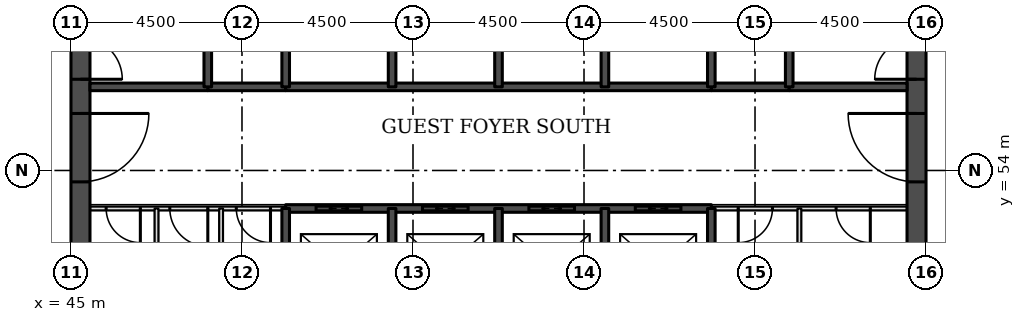
"""IFC4 building model, lengths in metres.
Left out: names, types, materials, properties, quantities, classifications, styles, units other than length and angle.
Written with IfcOpenShell. Run it as: python <this file> out.ifc"""

import sys

from ifc_helpers import new_model, si_unit, direction, frame, frame_2d, origin, place, context, subcontext, project, spatial, rectangle, extrude, element, fill, save


model = new_model("IFC4")
c1 = context("Model", 3, precision=1e-05, world=origin(), true_north=direction((0.0, 1.0)))
c2 = subcontext(c1, "Body", "Model", "MODEL_VIEW")
j1 = project(units=[si_unit("LENGTHUNIT", "METRE"), si_unit("PLANEANGLEUNIT", "RADIAN")], contexts=[c1])
p1 = place(None, origin())
s1 = spatial("IfcSite", under=j1, at=p1, CompositionType="ELEMENT")
p2 = place(p1, origin())
s2 = spatial("IfcBuilding", under=s1, at=p2, CompositionType="ELEMENT")
p3 = place(p2, frame((0.0, 0.0, 56.1)))
s3 = spatial("IfcBuildingStorey", under=s2, at=p3, CompositionType="ELEMENT", Elevation=56.1)
p4 = place(p3, frame((45.25, 49.5, 0.0), z_axis=(0.0, 0.0, 1.0), x_axis=(0.0, 1.0, 0.0)))
e1 = element("IfcWall", 1, at=p4, inside=s3, PredefinedType="SHEAR", context=c2, shape_type="SweptSolid", body=[
    extrude(rectangle(XDim=22.5, YDim=0.5, at=frame_2d((11.25, 0.0))), origin(), (0.0, 0.0, 1.0), 3.3),
])
p5 = place(p4, frame((4.2, 0.0, 0.0)))
e2 = element("IfcOpeningElement", 2, at=p5, cuts=e1, PredefinedType="OPENING", context=c2, shape_type="SweptSolid", body=[
    extrude(rectangle(XDim=1.8, YDim=2.1, at=frame_2d((0.9, 1.05))), frame((0.0, 0.26, 0.0), z_axis=(0.0, -1.0, 0.0), x_axis=(1.0, 0.0, 0.0)), (0.0, 0.0, 1.0), 0.52),
])
p6 = place(p4, frame((6.9, 0.0, 0.0)))
e3 = element("IfcOpeningElement", 3, at=p6, cuts=e1, PredefinedType="OPENING", context=c2, shape_type="SweptSolid", body=[
    extrude(rectangle(XDim=1.1, YDim=2.1, at=frame_2d((0.55, 1.05))), frame((0.0, 0.26, 0.0), z_axis=(0.0, -1.0, 0.0), x_axis=(1.0, 0.0, 0.0)), (0.0, 0.0, 1.0), 0.52),
])
p7 = place(p4, frame((13.6, 0.0, 0.0)))
e4 = element("IfcOpeningElement", 4, at=p7, cuts=e1, PredefinedType="OPENING", context=c2, shape_type="SweptSolid", body=[
    extrude(rectangle(XDim=1.1, YDim=2.1, at=frame_2d((0.55, 1.05))), frame((0.0, 0.26, 0.0), z_axis=(0.0, -1.0, 0.0), x_axis=(1.0, 0.0, 0.0)), (0.0, 0.0, 1.0), 0.52),
])
p8 = place(p4, frame((16.5, 0.0, 0.0)))
e5 = element("IfcOpeningElement", 5, at=p8, cuts=e1, PredefinedType="OPENING", context=c2, shape_type="SweptSolid", body=[
    extrude(rectangle(XDim=1.8, YDim=2.1, at=frame_2d((0.9, 1.05))), frame((0.0, 0.26, 0.0), z_axis=(0.0, -1.0, 0.0), x_axis=(1.0, 0.0, 0.0)), (0.0, 0.0, 1.0), 0.52),
])
p9 = place(p3, frame((67.25, 49.5, 0.0), z_axis=(0.0, 0.0, 1.0), x_axis=(0.0, 1.0, 0.0)))
e6 = element("IfcWall", 6, at=p9, inside=s3, PredefinedType="SHEAR", context=c2, shape_type="SweptSolid", body=[
    extrude(rectangle(XDim=22.5, YDim=0.5, at=frame_2d((11.25, 0.0))), origin(), (0.0, 0.0, 1.0), 3.3),
])
p10 = place(p9, frame((4.2, 0.0, 0.0)))
e7 = element("IfcOpeningElement", 7, at=p10, cuts=e6, PredefinedType="OPENING", context=c2, shape_type="SweptSolid", body=[
    extrude(rectangle(XDim=1.8, YDim=2.1, at=frame_2d((0.9, 1.05))), frame((0.0, 0.26, 0.0), z_axis=(0.0, -1.0, 0.0), x_axis=(1.0, 0.0, 0.0)), (0.0, 0.0, 1.0), 0.52),
])
p11 = place(p9, frame((6.9, 0.0, 0.0)))
e8 = element("IfcOpeningElement", 8, at=p11, cuts=e6, PredefinedType="OPENING", context=c2, shape_type="SweptSolid", body=[
    extrude(rectangle(XDim=1.1, YDim=2.1, at=frame_2d((0.55, 1.05))), frame((0.0, 0.26, 0.0), z_axis=(0.0, -1.0, 0.0), x_axis=(1.0, 0.0, 0.0)), (0.0, 0.0, 1.0), 0.52),
])
p12 = place(p9, frame((13.6, 0.0, 0.0)))
e9 = element("IfcOpeningElement", 9, at=p12, cuts=e6, PredefinedType="OPENING", context=c2, shape_type="SweptSolid", body=[
    extrude(rectangle(XDim=1.1, YDim=2.1, at=frame_2d((0.55, 1.05))), frame((0.0, 0.26, 0.0), z_axis=(0.0, -1.0, 0.0), x_axis=(1.0, 0.0, 0.0)), (0.0, 0.0, 1.0), 0.52),
])
p13 = place(p9, frame((16.5, 0.0, 0.0)))
e10 = element("IfcOpeningElement", 10, at=p13, cuts=e6, PredefinedType="OPENING", context=c2, shape_type="SweptSolid", body=[
    extrude(rectangle(XDim=1.8, YDim=2.1, at=frame_2d((0.9, 1.05))), frame((0.0, 0.26, 0.0), z_axis=(0.0, -1.0, 0.0), x_axis=(1.0, 0.0, 0.0)), (0.0, 0.0, 1.0), 0.52),
])
p14 = place(p3, frame((45.5, 53.0, 0.0), z_axis=(0.0, 0.0, 1.0), x_axis=(1.0, 0.0, 0.0)))
e11 = element("IfcWall", 11, at=p14, inside=s3, PredefinedType="PARTITIONING", context=c2, shape_type="SweptSolid", body=[
    extrude(rectangle(XDim=5.15, YDim=0.1, at=frame_2d((2.575, 0.0))), origin(), (0.0, 0.0, 1.0), 3.08),
])
p15 = place(p14, frame((0.426, 0.0, 0.0)))
e12 = element("IfcOpeningElement", 12, at=p15, cuts=e11, PredefinedType="OPENING", context=c2, shape_type="SweptSolid", body=[
    extrude(rectangle(XDim=0.9, YDim=2.1, at=frame_2d((0.45, 1.05))), frame((0.0, 0.06, 0.0), z_axis=(0.0, -1.0, 0.0), x_axis=(1.0, 0.0, 0.0)), (0.0, 0.0, 1.0), 0.12),
])
p16 = place(p14, frame((2.101, 0.0, 0.0)))
e13 = element("IfcOpeningElement", 13, at=p16, cuts=e11, PredefinedType="OPENING", context=c2, shape_type="SweptSolid", body=[
    extrude(rectangle(XDim=1.0, YDim=2.1, at=frame_2d((0.5, 1.05))), frame((0.0, 0.06, 0.0), z_axis=(0.0, -1.0, 0.0), x_axis=(1.0, 0.0, 0.0)), (0.0, 0.0, 1.0), 0.12),
])
p17 = place(p14, frame((3.85, 0.0, 0.0)))
e14 = element("IfcOpeningElement", 14, at=p17, cuts=e11, PredefinedType="OPENING", context=c2, shape_type="SweptSolid", body=[
    extrude(rectangle(XDim=0.9, YDim=2.1, at=frame_2d((0.45, 1.05))), frame((0.0, 0.06, 0.0), z_axis=(0.0, -1.0, 0.0), x_axis=(1.0, 0.0, 0.0)), (0.0, 0.0, 1.0), 0.12),
])
p18 = place(p3, frame((61.85, 53.0, 0.0), z_axis=(0.0, 0.0, 1.0), x_axis=(1.0, 0.0, 0.0)))
e15 = element("IfcWall", 15, at=p18, inside=s3, PredefinedType="PARTITIONING", context=c2, shape_type="SweptSolid", body=[
    extrude(rectangle(XDim=5.15, YDim=0.1, at=frame_2d((2.575, 0.0))), origin(), (0.0, 0.0, 1.0), 3.08),
])
p19 = place(p18, frame((3.284, 0.0, 0.0)))
e16 = element("IfcOpeningElement", 16, at=p19, cuts=e15, PredefinedType="OPENING", context=c2, shape_type="SweptSolid", body=[
    extrude(rectangle(XDim=0.9, YDim=2.1, at=frame_2d((0.45, 1.05))), frame((0.0, 0.06, 0.0), z_axis=(0.0, -1.0, 0.0), x_axis=(1.0, 0.0, 0.0)), (0.0, 0.0, 1.0), 0.12),
])
p20 = place(p18, frame((0.709, 0.0, 0.0)))
e17 = element("IfcOpeningElement", 17, at=p20, cuts=e15, PredefinedType="OPENING", context=c2, shape_type="SweptSolid", body=[
    extrude(rectangle(XDim=0.9, YDim=2.1, at=frame_2d((0.45, 1.05))), frame((0.0, 0.06, 0.0), z_axis=(0.0, -1.0, 0.0), x_axis=(1.0, 0.0, 0.0)), (0.0, 0.0, 1.0), 0.12),
])
p21 = place(p3, frame((50.65, 53.0, 0.0), z_axis=(0.0, 0.0, 1.0), x_axis=(1.0, 0.0, 0.0)))
e18 = element("IfcWall", 18, at=p21, inside=s3, PredefinedType="SOLIDWALL", context=c2, shape_type="SweptSolid", body=[
    extrude(rectangle(XDim=11.2, YDim=0.2, at=frame_2d((5.6, 0.0))), origin(), (0.0, 0.0, 1.0), 3.08),
])
p22 = place(p21, frame((0.8, 0.0, 0.0)))
e19 = element("IfcOpeningElement", 19, at=p22, cuts=e18, PredefinedType="OPENING", context=c2, shape_type="SweptSolid", body=[
    extrude(rectangle(XDim=1.2, YDim=2.1, at=frame_2d((0.6, 1.05))), frame((0.0, 0.11, 0.0), z_axis=(0.0, -1.0, 0.0), x_axis=(1.0, 0.0, 0.0)), (0.0, 0.0, 1.0), 0.22),
])
p23 = place(p21, frame((3.6, 0.0, 0.0)))
e20 = element("IfcOpeningElement", 20, at=p23, cuts=e18, PredefinedType="OPENING", context=c2, shape_type="SweptSolid", body=[
    extrude(rectangle(XDim=1.2, YDim=2.1, at=frame_2d((0.6, 1.05))), frame((0.0, 0.11, 0.0), z_axis=(0.0, -1.0, 0.0), x_axis=(1.0, 0.0, 0.0)), (0.0, 0.0, 1.0), 0.22),
])
p24 = place(p21, frame((6.4, 0.0, 0.0)))
e21 = element("IfcOpeningElement", 21, at=p24, cuts=e18, PredefinedType="OPENING", context=c2, shape_type="SweptSolid", body=[
    extrude(rectangle(XDim=1.2, YDim=2.1, at=frame_2d((0.6, 1.05))), frame((0.0, 0.11, 0.0), z_axis=(0.0, -1.0, 0.0), x_axis=(1.0, 0.0, 0.0)), (0.0, 0.0, 1.0), 0.22),
])
p25 = place(p21, frame((9.2, 0.0, 0.0)))
e22 = element("IfcOpeningElement", 22, at=p25, cuts=e18, PredefinedType="OPENING", context=c2, shape_type="SweptSolid", body=[
    extrude(rectangle(XDim=1.2, YDim=2.1, at=frame_2d((0.6, 1.05))), frame((0.0, 0.11, 0.0), z_axis=(0.0, -1.0, 0.0), x_axis=(1.0, 0.0, 0.0)), (0.0, 0.0, 1.0), 0.22),
])
for number, where, z_axis, x_axis in (
    (23, (48.6, 56.2, 0.0), (0.0, 0.0, 1.0), (1.0, 0.0, 0.0)),
    (24, (61.85, 56.2, 0.0), (0.0, 0.0, 1.0), (1.0, 0.0, 0.0)),
):
    element("IfcWall", number, at=place(p3, frame(where, z_axis=z_axis, x_axis=x_axis)), inside=s3, PredefinedType="SOLIDWALL", context=c2, shape_type="SweptSolid", body=[
        extrude(rectangle(XDim=2.05, YDim=0.2, at=frame_2d((1.025, 0.0))), origin(), (0.0, 0.0, 1.0), 3.08),
    ])
p26 = place(p3, frame((45.5, 56.2, 0.0), z_axis=(0.0, 0.0, 1.0), x_axis=(1.0, 0.0, 0.0)))
e25 = element("IfcWall", 25, at=p26, inside=s3, PredefinedType="SOLIDWALL", context=c2, shape_type="SweptSolid", body=[
    extrude(rectangle(XDim=3.1, YDim=0.2, at=frame_2d((1.55, 0.0))), origin(), (0.0, 0.0, 1.0), 3.08),
])
p27 = place(p3, frame((50.65, 56.2, 0.0), z_axis=(0.0, 0.0, 1.0), x_axis=(1.0, 0.0, 0.0)))
e26 = element("IfcWall", 26, at=p27, inside=s3, PredefinedType="SOLIDWALL", context=c2, shape_type="SweptSolid", body=[
    extrude(rectangle(XDim=11.2, YDim=0.2, at=frame_2d((5.6, 0.0))), origin(), (0.0, 0.0, 1.0), 3.08),
])
p28 = place(p3, frame((63.9, 56.2, 0.0), z_axis=(0.0, 0.0, 1.0), x_axis=(1.0, 0.0, 0.0)))
e27 = element("IfcWall", 27, at=p28, inside=s3, PredefinedType="SOLIDWALL", context=c2, shape_type="SweptSolid", body=[
    extrude(rectangle(XDim=3.1, YDim=0.2, at=frame_2d((1.55, 0.0))), origin(), (0.0, 0.0, 1.0), 3.08),
])
p29 = place(p3, frame((47.251, 50.0, 0.0), z_axis=(0.0, 0.0, 1.0), x_axis=(0.0, 1.0, 0.0)))
e28 = element("IfcWall", 28, at=p29, inside=s3, PredefinedType="PARTITIONING", context=c2, shape_type="SweptSolid", body=[
    extrude(rectangle(XDim=3.0, YDim=0.1, at=frame_2d((1.5, 0.0))), origin(), (0.0, 0.0, 1.0), 3.08),
])
p30 = place(p3, frame((48.6, 56.2, 0.0), z_axis=(0.0, 0.0, 1.0), x_axis=(0.0, 1.0, 0.0)))
e29 = element("IfcWall", 29, at=p30, inside=s3, PredefinedType="SOLIDWALL", context=c2, shape_type="SweptSolid", body=[
    extrude(rectangle(XDim=5.8, YDim=0.2, at=frame_2d((2.9, 0.0))), origin(), (0.0, 0.0, 1.0), 3.08),
])
p31 = place(p3, frame((48.95, 50.0, 0.0), z_axis=(0.0, 0.0, 1.0), x_axis=(0.0, 1.0, 0.0)))
e30 = element("IfcWall", 30, at=p31, inside=s3, PredefinedType="PARTITIONING", context=c2, shape_type="SweptSolid", body=[
    extrude(rectangle(XDim=3.0, YDim=0.1, at=frame_2d((1.5, 0.0))), origin(), (0.0, 0.0, 1.0), 3.08),
])
p32 = place(p3, frame((50.65, 50.0, 0.0), z_axis=(0.0, 0.0, 1.0), x_axis=(0.0, 1.0, 0.0)))
e31 = element("IfcWall", 31, at=p32, inside=s3, PredefinedType="SOLIDWALL", context=c2, shape_type="SweptSolid", body=[
    extrude(rectangle(XDim=3.0, YDim=0.2, at=frame_2d((1.5, 0.0))), origin(), (0.0, 0.0, 1.0), 3.08),
])
p33 = place(p3, frame((50.65, 56.2, 0.0), z_axis=(0.0, 0.0, 1.0), x_axis=(0.0, 1.0, 0.0)))
e32 = element("IfcWall", 32, at=p33, inside=s3, PredefinedType="SOLIDWALL", context=c2, shape_type="SweptSolid", body=[
    extrude(rectangle(XDim=2.8, YDim=0.2, at=frame_2d((1.4, 0.0))), origin(), (0.0, 0.0, 1.0), 3.08),
])
p34 = place(p3, frame((53.45, 50.0, 0.0), z_axis=(0.0, 0.0, 1.0), x_axis=(0.0, 1.0, 0.0)))
e33 = element("IfcWall", 33, at=p34, inside=s3, PredefinedType="SOLIDWALL", context=c2, shape_type="SweptSolid", body=[
    extrude(rectangle(XDim=3.0, YDim=0.2, at=frame_2d((1.5, 0.0))), origin(), (0.0, 0.0, 1.0), 3.08),
])
p35 = place(p3, frame((53.45, 56.2, 0.0), z_axis=(0.0, 0.0, 1.0), x_axis=(0.0, 1.0, 0.0)))
e34 = element("IfcWall", 34, at=p35, inside=s3, PredefinedType="SOLIDWALL", context=c2, shape_type="SweptSolid", body=[
    extrude(rectangle(XDim=2.8, YDim=0.2, at=frame_2d((1.4, 0.0))), origin(), (0.0, 0.0, 1.0), 3.08),
])
p36 = place(p3, frame((56.25, 50.0, 0.0), z_axis=(0.0, 0.0, 1.0), x_axis=(0.0, 1.0, 0.0)))
e35 = element("IfcWall", 35, at=p36, inside=s3, PredefinedType="SOLIDWALL", context=c2, shape_type="SweptSolid", body=[
    extrude(rectangle(XDim=3.0, YDim=0.2, at=frame_2d((1.5, 0.0))), origin(), (0.0, 0.0, 1.0), 3.08),
])
p37 = place(p3, frame((56.25, 56.2, 0.0), z_axis=(0.0, 0.0, 1.0), x_axis=(0.0, 1.0, 0.0)))
e36 = element("IfcWall", 36, at=p37, inside=s3, PredefinedType="SOLIDWALL", context=c2, shape_type="SweptSolid", body=[
    extrude(rectangle(XDim=2.8, YDim=0.2, at=frame_2d((1.4, 0.0))), origin(), (0.0, 0.0, 1.0), 3.08),
])
p38 = place(p3, frame((59.05, 50.0, 0.0), z_axis=(0.0, 0.0, 1.0), x_axis=(0.0, 1.0, 0.0)))
e37 = element("IfcWall", 37, at=p38, inside=s3, PredefinedType="SOLIDWALL", context=c2, shape_type="SweptSolid", body=[
    extrude(rectangle(XDim=3.0, YDim=0.2, at=frame_2d((1.5, 0.0))), origin(), (0.0, 0.0, 1.0), 3.08),
])
p39 = place(p3, frame((59.05, 56.2, 0.0), z_axis=(0.0, 0.0, 1.0), x_axis=(0.0, 1.0, 0.0)))
e38 = element("IfcWall", 38, at=p39, inside=s3, PredefinedType="SOLIDWALL", context=c2, shape_type="SweptSolid", body=[
    extrude(rectangle(XDim=2.8, YDim=0.2, at=frame_2d((1.4, 0.0))), origin(), (0.0, 0.0, 1.0), 3.08),
])
p40 = place(p3, frame((61.85, 50.0, 0.0), z_axis=(0.0, 0.0, 1.0), x_axis=(0.0, 1.0, 0.0)))
e39 = element("IfcWall", 39, at=p40, inside=s3, PredefinedType="SOLIDWALL", context=c2, shape_type="SweptSolid", body=[
    extrude(rectangle(XDim=3.0, YDim=0.2, at=frame_2d((1.5, 0.0))), origin(), (0.0, 0.0, 1.0), 3.08),
])
p41 = place(p3, frame((61.85, 56.2, 0.0), z_axis=(0.0, 0.0, 1.0), x_axis=(0.0, 1.0, 0.0)))
e40 = element("IfcWall", 40, at=p41, inside=s3, PredefinedType="SOLIDWALL", context=c2, shape_type="SweptSolid", body=[
    extrude(rectangle(XDim=2.8, YDim=0.2, at=frame_2d((1.4, 0.0))), origin(), (0.0, 0.0, 1.0), 3.08),
])
p42 = place(p3, frame((63.9, 56.2, 0.0), z_axis=(0.0, 0.0, 1.0), x_axis=(0.0, 1.0, 0.0)))
e41 = element("IfcWall", 41, at=p42, inside=s3, PredefinedType="SOLIDWALL", context=c2, shape_type="SweptSolid", body=[
    extrude(rectangle(XDim=5.8, YDim=0.2, at=frame_2d((2.9, 0.0))), origin(), (0.0, 0.0, 1.0), 3.08),
])
p43 = place(p3, frame((64.167, 50.0, 0.0), z_axis=(0.0, 0.0, 1.0), x_axis=(0.0, 1.0, 0.0)))
e42 = element("IfcWall", 42, at=p43, inside=s3, PredefinedType="PARTITIONING", context=c2, shape_type="SweptSolid", body=[
    extrude(rectangle(XDim=3.0, YDim=0.1, at=frame_2d((1.5, 0.0))), origin(), (0.0, 0.0, 1.0), 3.08),
])
p44 = place(p22, origin())
e43 = element("IfcDoor", 43, at=p44, inside=s3, OperationType="DOUBLE_DOOR_SLIDING", PredefinedType="DOOR", context=c2, shape_type="SweptSolid", body=[
    extrude(rectangle(XDim=1.2, YDim=2.1, at=frame_2d((0.6, 1.05))), frame((0.0, 0.025, 0.0), z_axis=(0.0, -1.0, 0.0), x_axis=(1.0, 0.0, 0.0)), (0.0, 0.0, 1.0), 0.05),
])
fill(e19, e43)
p45 = place(p23, origin())
e44 = element("IfcDoor", 44, at=p45, inside=s3, OperationType="DOUBLE_DOOR_SLIDING", PredefinedType="DOOR", context=c2, shape_type="SweptSolid", body=[
    extrude(rectangle(XDim=1.2, YDim=2.1, at=frame_2d((0.6, 1.05))), frame((0.0, 0.025, 0.0), z_axis=(0.0, -1.0, 0.0), x_axis=(1.0, 0.0, 0.0)), (0.0, 0.0, 1.0), 0.05),
])
fill(e20, e44)
p46 = place(p24, origin())
e45 = element("IfcDoor", 45, at=p46, inside=s3, OperationType="DOUBLE_DOOR_SLIDING", PredefinedType="DOOR", context=c2, shape_type="SweptSolid", body=[
    extrude(rectangle(XDim=1.2, YDim=2.1, at=frame_2d((0.6, 1.05))), frame((0.0, 0.025, 0.0), z_axis=(0.0, -1.0, 0.0), x_axis=(1.0, 0.0, 0.0)), (0.0, 0.0, 1.0), 0.05),
])
fill(e21, e45)
p47 = place(p25, origin())
e46 = element("IfcDoor", 46, at=p47, inside=s3, OperationType="DOUBLE_DOOR_SLIDING", PredefinedType="DOOR", context=c2, shape_type="SweptSolid", body=[
    extrude(rectangle(XDim=1.2, YDim=2.1, at=frame_2d((0.6, 1.05))), frame((0.0, 0.025, 0.0), z_axis=(0.0, -1.0, 0.0), x_axis=(1.0, 0.0, 0.0)), (0.0, 0.0, 1.0), 0.05),
])
fill(e22, e46)
p48 = place(p5, frame((1.8, 0.0, 0.0), z_axis=(0.0, 0.0, 1.0), x_axis=(-1.0, 0.0, 0.0)))
e47 = element("IfcDoor", 47, at=p48, inside=s3, OperationType="SINGLE_SWING_LEFT", PredefinedType="DOOR", context=c2, shape_type="SweptSolid", body=[
    extrude(rectangle(XDim=1.8, YDim=2.1, at=frame_2d((0.9, 1.05))), frame((0.0, 0.025, 0.0), z_axis=(0.0, -1.0, 0.0), x_axis=(1.0, 0.0, 0.0)), (0.0, 0.0, 1.0), 0.05),
])
fill(e2, e47)
p49 = place(p6, frame((1.1, 0.0, 0.0), z_axis=(0.0, 0.0, 1.0), x_axis=(-1.0, 0.0, 0.0)))
e48 = element("IfcDoor", 48, at=p49, inside=s3, OperationType="SINGLE_SWING_RIGHT", PredefinedType="DOOR", context=c2, shape_type="SweptSolid", body=[
    extrude(rectangle(XDim=1.1, YDim=2.1, at=frame_2d((0.55, 1.05))), frame((0.0, 0.025, 0.0), z_axis=(0.0, -1.0, 0.0), x_axis=(1.0, 0.0, 0.0)), (0.0, 0.0, 1.0), 0.05),
])
fill(e3, e48)
p50 = place(p10, origin())
e49 = element("IfcDoor", 49, at=p50, inside=s3, OperationType="SINGLE_SWING_RIGHT", PredefinedType="DOOR", context=c2, shape_type="SweptSolid", body=[
    extrude(rectangle(XDim=1.8, YDim=2.1, at=frame_2d((0.9, 1.05))), frame((0.0, 0.025, 0.0), z_axis=(0.0, -1.0, 0.0), x_axis=(1.0, 0.0, 0.0)), (0.0, 0.0, 1.0), 0.05),
])
fill(e7, e49)
p51 = place(p11, origin())
e50 = element("IfcDoor", 50, at=p51, inside=s3, OperationType="SINGLE_SWING_LEFT", PredefinedType="DOOR", context=c2, shape_type="SweptSolid", body=[
    extrude(rectangle(XDim=1.1, YDim=2.1, at=frame_2d((0.55, 1.05))), frame((0.0, 0.025, 0.0), z_axis=(0.0, -1.0, 0.0), x_axis=(1.0, 0.0, 0.0)), (0.0, 0.0, 1.0), 0.05),
])
fill(e8, e50)
p52 = place(p19, frame((0.9, 0.0, 0.0), z_axis=(0.0, 0.0, 1.0), x_axis=(-1.0, 0.0, 0.0)))
e51 = element("IfcDoor", 51, at=p52, inside=s3, OperationType="SINGLE_SWING_LEFT", PredefinedType="DOOR", context=c2, shape_type="SweptSolid", body=[
    extrude(rectangle(XDim=0.9, YDim=2.1, at=frame_2d((0.45, 1.05))), frame((0.0, 0.025, 0.0), z_axis=(0.0, -1.0, 0.0), x_axis=(1.0, 0.0, 0.0)), (0.0, 0.0, 1.0), 0.05),
])
fill(e16, e51)
p53 = place(p20, frame((0.9, 0.0, 0.0), z_axis=(0.0, 0.0, 1.0), x_axis=(-1.0, 0.0, 0.0)))
e52 = element("IfcDoor", 52, at=p53, inside=s3, OperationType="SINGLE_SWING_RIGHT", PredefinedType="DOOR", context=c2, shape_type="SweptSolid", body=[
    extrude(rectangle(XDim=0.9, YDim=2.1, at=frame_2d((0.45, 1.05))), frame((0.0, 0.025, 0.0), z_axis=(0.0, -1.0, 0.0), x_axis=(1.0, 0.0, 0.0)), (0.0, 0.0, 1.0), 0.05),
])
fill(e17, e52)
p54 = place(p15, frame((0.9, 0.0, 0.0), z_axis=(0.0, 0.0, 1.0), x_axis=(-1.0, 0.0, 0.0)))
e53 = element("IfcDoor", 53, at=p54, inside=s3, OperationType="SINGLE_SWING_LEFT", PredefinedType="DOOR", context=c2, shape_type="SweptSolid", body=[
    extrude(rectangle(XDim=0.9, YDim=2.1, at=frame_2d((0.45, 1.05))), frame((0.0, 0.025, 0.0), z_axis=(0.0, -1.0, 0.0), x_axis=(1.0, 0.0, 0.0)), (0.0, 0.0, 1.0), 0.05),
])
fill(e12, e53)
p55 = place(p16, frame((1.0, 0.0, 0.0), z_axis=(0.0, 0.0, 1.0), x_axis=(-1.0, 0.0, 0.0)))
e54 = element("IfcDoor", 54, at=p55, inside=s3, OperationType="SINGLE_SWING_LEFT", PredefinedType="DOOR", context=c2, shape_type="SweptSolid", body=[
    extrude(rectangle(XDim=1.0, YDim=2.1, at=frame_2d((0.5, 1.05))), frame((0.0, 0.025, 0.0), z_axis=(0.0, -1.0, 0.0), x_axis=(1.0, 0.0, 0.0)), (0.0, 0.0, 1.0), 0.05),
])
fill(e13, e54)
p56 = place(p17, frame((0.9, 0.0, 0.0), z_axis=(0.0, 0.0, 1.0), x_axis=(-1.0, 0.0, 0.0)))
e55 = element("IfcDoor", 55, at=p56, inside=s3, OperationType="SINGLE_SWING_LEFT", PredefinedType="DOOR", context=c2, shape_type="SweptSolid", body=[
    extrude(rectangle(XDim=0.9, YDim=2.1, at=frame_2d((0.45, 1.05))), frame((0.0, 0.025, 0.0), z_axis=(0.0, -1.0, 0.0), x_axis=(1.0, 0.0, 0.0)), (0.0, 0.0, 1.0), 0.05),
])
fill(e14, e55)
save(model, sys.argv[1])
